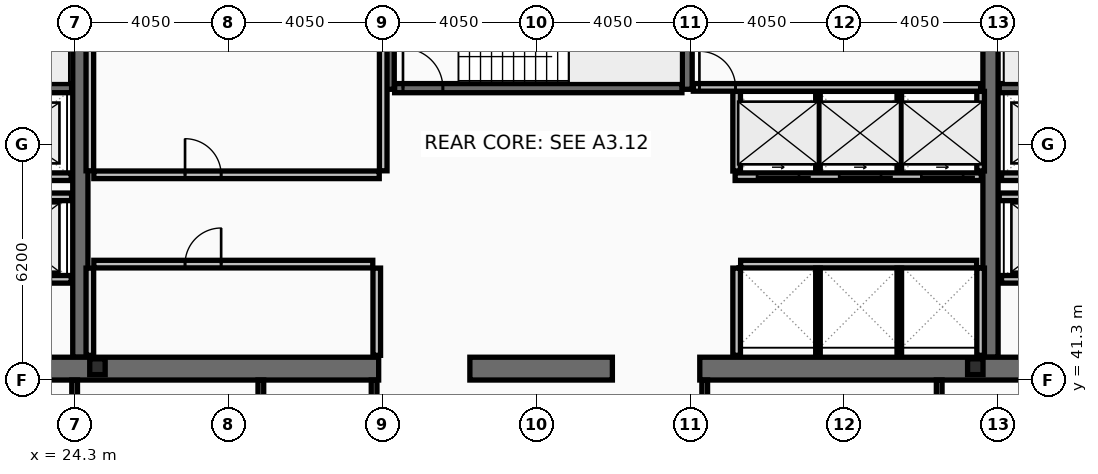
"""IFC4 building model, lengths in metres.
Left out: names, types, materials, properties, quantities, classifications, styles, units other than length and angle.
Written with IfcOpenShell. Run it as: python <this file> out.ifc"""

import sys

from ifc_helpers import new_model, si_unit, direction, frame, frame_2d, origin, origin_2d, place, context, subcontext, project, spatial, rectangle, i_section, extrude, element, fill, save


model = new_model("IFC4")
c1 = context("Model", 3, precision=1e-05, world=origin(), true_north=direction((0.0, 1.0)))
c2 = subcontext(c1, "Body", "Model", "MODEL_VIEW")
j1 = project(units=[si_unit("LENGTHUNIT", "METRE"), si_unit("PLANEANGLEUNIT", "RADIAN")], contexts=[c1])
p1 = place(None, origin())
s1 = spatial("IfcSite", under=j1, at=p1, CompositionType="ELEMENT")
p2 = place(p1, origin())
s2 = spatial("IfcBuilding", under=s1, at=p2, CompositionType="ELEMENT")
p3 = place(p2, frame((0.0, 0.0, 249.8)))
s3 = spatial("IfcBuildingStorey", under=s2, at=p3, CompositionType="ELEMENT", Elevation=249.8)
for number, where, z_axis, x_axis in (
    (1, (24.45, 41.9, 0.0), (0.0, 0.0, 1.0), (0.0, 1.0, 0.0)),
    (2, (48.4, 41.9, 0.0), (0.0, 0.0, 1.0), (0.0, 1.0, 0.0)),
):
    element("IfcWall", number, at=place(p3, frame(where, z_axis=z_axis, x_axis=x_axis)), inside=s3, PredefinedType="SHEAR", context=c2, shape_type="SweptSolid", body=[
        extrude(rectangle(XDim=11.2, YDim=0.4, at=frame_2d((5.6, 0.0))), origin(), (0.0, 0.0, 1.0), 3.44),
    ])
p4 = place(p3, frame((32.3, 41.6, 0.0), z_axis=(0.0, 0.0, 1.0), x_axis=(-1.0, 0.0, 0.0)))
e3 = element("IfcWall", 3, at=p4, inside=s3, PredefinedType="SHEAR", context=c2, shape_type="SweptSolid", body=[
    extrude(rectangle(XDim=11.45, YDim=0.6, at=frame_2d((5.725, 0.0))), origin(), (0.0, 0.0, 1.0), 3.44),
])
p5 = place(p3, frame((38.45, 41.6, 0.0), z_axis=(0.0, 0.0, 1.0), x_axis=(-1.0, 0.0, 0.0)))
e4 = element("IfcWall", 4, at=p5, inside=s3, PredefinedType="SHEAR", context=c2, shape_type="SweptSolid", body=[
    extrude(rectangle(XDim=3.75, YDim=0.6, at=frame_2d((1.875, 0.0))), origin(), (0.0, 0.0, 1.0), 3.44),
])
p6 = place(p3, frame((52.05, 41.6, 0.0), z_axis=(0.0, 0.0, 1.0), x_axis=(-1.0, 0.0, 0.0)))
e5 = element("IfcWall", 5, at=p6, inside=s3, PredefinedType="SHEAR", context=c2, shape_type="SweptSolid", body=[
    extrude(rectangle(XDim=11.3, YDim=0.6, at=frame_2d((5.65, 0.0))), origin(), (0.0, 0.0, 1.0), 3.44),
])
for number, where, z_axis, x_axis in (
    (6, (32.58, 48.95, 0.0), (0.0, 0.0, 1.0), (0.0, 1.0, 0.0)),
    (7, (40.42, 48.95, 0.0), (0.0, 0.0, 1.0), (0.0, 1.0, 0.0)),
):
    element("IfcWall", number, at=place(p3, frame(where, z_axis=z_axis, x_axis=x_axis)), inside=s3, PredefinedType="SHEAR", context=c2, shape_type="SweptSolid", body=[
        extrude(rectangle(XDim=4.15, YDim=0.26, at=frame_2d((2.075, 0.0))), origin(), (0.0, 0.0, 1.0), 3.44),
    ])
p7 = place(p3, frame((16.8, 48.98, 0.0), z_axis=(0.0, 0.0, 1.0), x_axis=(1.0, 0.0, 0.0)))
e8 = element("IfcWall", 8, at=p7, inside=s3, PredefinedType="SHEAR", context=c2, shape_type="SweptSolid", body=[
    extrude(rectangle(XDim=7.42, YDim=0.24, at=frame_2d((3.71, 0.0))), origin(), (0.0, 0.0, 1.0), 3.44),
])
p8 = place(p7, frame((0.22, 0.0, 0.0)))
e9 = element("IfcOpeningElement", 9, at=p8, cuts=e8, PredefinedType="OPENING", context=c2, shape_type="SweptSolid", body=[
    extrude(rectangle(XDim=1.05, YDim=2.15, at=frame_2d((0.525, 1.075))), frame((0.0, 0.13, 0.0), z_axis=(0.0, -1.0, 0.0), x_axis=(1.0, 0.0, 0.0)), (0.0, 0.0, 1.0), 0.26),
])
p9 = place(p3, frame((48.63, 48.98, 0.0), z_axis=(0.0, 0.0, 1.0), x_axis=(1.0, 0.0, 0.0)))
e10 = element("IfcWall", 10, at=p9, inside=s3, PredefinedType="SHEAR", context=c2, shape_type="SweptSolid", body=[
    extrude(rectangle(XDim=7.47, YDim=0.24, at=frame_2d((3.735, 0.0))), origin(), (0.0, 0.0, 1.0), 3.44),
])
p10 = place(p9, frame((6.2, 0.0, 0.0)))
e11 = element("IfcOpeningElement", 11, at=p10, cuts=e10, PredefinedType="OPENING", context=c2, shape_type="SweptSolid", body=[
    extrude(rectangle(XDim=1.05, YDim=2.15, at=frame_2d((0.525, 1.075))), frame((0.0, 0.13, 0.0), z_axis=(0.0, -1.0, 0.0), x_axis=(1.0, 0.0, 0.0)), (0.0, 0.0, 1.0), 0.26),
])
p11 = place(p3, frame((32.72, 48.98, 0.0), z_axis=(0.0, 0.0, 1.0), x_axis=(1.0, 0.0, 0.0)))
e12 = element("IfcWall", 12, at=p11, inside=s3, PredefinedType="SHEAR", context=c2, shape_type="SweptSolid", body=[
    extrude(rectangle(XDim=7.56, YDim=0.24, at=frame_2d((3.78, 0.0))), origin(), (0.0, 0.0, 1.0), 3.44),
])
p12 = place(p11, frame((0.22, 0.0, 0.0)))
e13 = element("IfcOpeningElement", 13, at=p12, cuts=e12, PredefinedType="OPENING", context=c2, shape_type="SweptSolid", body=[
    extrude(rectangle(XDim=1.05, YDim=2.15, at=frame_2d((0.525, 1.075))), frame((0.0, 0.13, 0.0), z_axis=(0.0, -1.0, 0.0), x_axis=(1.0, 0.0, 0.0)), (0.0, 0.0, 1.0), 0.26),
])
for number, where, z_axis, x_axis in (
    (14, (24.9, 41.65, 0.0), (0.0, 0.0, 1.0), (1.0, 0.0, 0.0)),
    (15, (48.0, 41.65, 0.0), (0.0, 0.0, 1.0), (1.0, 0.0, 0.0)),
):
    element("IfcColumn", number, at=place(p3, frame(where, z_axis=z_axis, x_axis=x_axis)), inside=s3, PredefinedType="COLUMN", context=c2, shape_type="SweptSolid", body=[
        extrude(i_section(OverallWidth=0.406, OverallDepth=0.416, WebThickness=0.03, FlangeThickness=0.048, at=origin_2d()), origin(), (0.0, 0.0, 1.0), 3.6),
    ])
p13 = place(p3, frame((51.61, 43.95, 0.0), z_axis=(0.0, 0.0, 1.0), x_axis=(-1.0, 0.0, 0.0)))
e16 = element("IfcWall", 16, at=p13, inside=s3, PredefinedType="PARTITIONING", context=c2, shape_type="SweptSolid", body=[
    extrude(rectangle(XDim=2.92, YDim=0.2, at=frame_2d((1.46, 0.0))), origin(), (0.0, 0.0, 1.0), 3.44),
])
p14 = place(p13, frame((0.81, 0.0, 0.0)))
e17 = element("IfcOpeningElement", 17, at=p14, cuts=e16, PredefinedType="OPENING", context=c2, shape_type="SweptSolid", body=[
    extrude(rectangle(XDim=1.3, YDim=2.18, at=frame_2d((0.65, 1.09))), frame((0.0, 0.11, 0.0), z_axis=(0.0, -1.0, 0.0), x_axis=(1.0, 0.0, 0.0)), (0.0, 0.0, 1.0), 0.22),
])
p15 = place(p3, frame((24.21, 43.95, 0.0), z_axis=(0.0, 0.0, 1.0), x_axis=(-1.0, 0.0, 0.0)))
e18 = element("IfcWall", 18, at=p15, inside=s3, PredefinedType="PARTITIONING", context=c2, shape_type="SweptSolid", body=[
    extrude(rectangle(XDim=2.97, YDim=0.2, at=frame_2d((1.485, 0.0))), origin(), (0.0, 0.0, 1.0), 3.44),
])
p16 = place(p15, frame((0.86, 0.0, 0.0)))
e19 = element("IfcOpeningElement", 19, at=p16, cuts=e18, PredefinedType="OPENING", context=c2, shape_type="SweptSolid", body=[
    extrude(rectangle(XDim=1.3, YDim=2.18, at=frame_2d((0.65, 1.09))), frame((0.0, 0.11, 0.0), z_axis=(0.0, -1.0, 0.0), x_axis=(1.0, 0.0, 0.0)), (0.0, 0.0, 1.0), 0.22),
])
p17 = place(p3, frame((51.61, 46.65, 0.0), z_axis=(0.0, 0.0, 1.0), x_axis=(-1.0, 0.0, 0.0)))
e20 = element("IfcWall", 20, at=p17, inside=s3, PredefinedType="PARTITIONING", context=c2, shape_type="SweptSolid", body=[
    extrude(rectangle(XDim=2.92, YDim=0.2, at=frame_2d((1.46, 0.0))), origin(), (0.0, 0.0, 1.0), 3.44),
])
p18 = place(p17, frame((0.86, 0.0, 0.0)))
e21 = element("IfcOpeningElement", 21, at=p18, cuts=e20, PredefinedType="OPENING", context=c2, shape_type="SweptSolid", body=[
    extrude(rectangle(XDim=1.2, YDim=2.18, at=frame_2d((0.6, 1.09))), frame((0.0, 0.11, 0.0), z_axis=(0.0, -1.0, 0.0), x_axis=(1.0, 0.0, 0.0)), (0.0, 0.0, 1.0), 0.22),
])
p19 = place(p3, frame((24.21, 46.65, 0.0), z_axis=(0.0, 0.0, 1.0), x_axis=(-1.0, 0.0, 0.0)))
e22 = element("IfcWall", 22, at=p19, inside=s3, PredefinedType="PARTITIONING", context=c2, shape_type="SweptSolid", body=[
    extrude(rectangle(XDim=2.97, YDim=0.2, at=frame_2d((1.485, 0.0))), origin(), (0.0, 0.0, 1.0), 3.44),
])
p20 = place(p19, frame((0.91, 0.0, 0.0)))
e23 = element("IfcOpeningElement", 23, at=p20, cuts=e22, PredefinedType="OPENING", context=c2, shape_type="SweptSolid", body=[
    extrude(rectangle(XDim=1.2, YDim=2.18, at=frame_2d((0.6, 1.09))), frame((0.0, 0.11, 0.0), z_axis=(0.0, -1.0, 0.0), x_axis=(1.0, 0.0, 0.0)), (0.0, 0.0, 1.0), 0.22),
])
p21 = place(p3, frame((48.16, 46.65, 0.0), z_axis=(0.0, 0.0, 1.0), x_axis=(-1.0, 0.0, 0.0)))
e24 = element("IfcWall", 24, at=p21, inside=s3, PredefinedType="PARTITIONING", context=c2, shape_type="SweptSolid", body=[
    extrude(rectangle(XDim=6.48, YDim=0.2, at=frame_2d((3.24, 0.0))), origin(), (0.0, 0.0, 1.0), 3.44),
])
p22 = place(p21, frame((4.8, 0.0, 0.0)))
e25 = element("IfcOpeningElement", 25, at=p22, cuts=e24, PredefinedType="OPENING", context=c2, shape_type="SweptSolid", body=[
    extrude(rectangle(XDim=1.1, YDim=2.18, at=frame_2d((0.55, 1.09))), frame((0.0, 0.11, 0.0), z_axis=(0.0, -1.0, 0.0), x_axis=(1.0, 0.0, 0.0)), (0.0, 0.0, 1.0), 0.22),
])
p23 = place(p21, frame((2.64, 0.0, 0.0)))
e26 = element("IfcOpeningElement", 26, at=p23, cuts=e24, PredefinedType="OPENING", context=c2, shape_type="SweptSolid", body=[
    extrude(rectangle(XDim=1.1, YDim=2.18, at=frame_2d((0.55, 1.09))), frame((0.0, 0.11, 0.0), z_axis=(0.0, -1.0, 0.0), x_axis=(1.0, 0.0, 0.0)), (0.0, 0.0, 1.0), 0.22),
])
p24 = place(p21, frame((0.48, 0.0, 0.0)))
e27 = element("IfcOpeningElement", 27, at=p24, cuts=e24, PredefinedType="OPENING", context=c2, shape_type="SweptSolid", body=[
    extrude(rectangle(XDim=1.1, YDim=2.18, at=frame_2d((0.55, 1.09))), frame((0.0, 0.11, 0.0), z_axis=(0.0, -1.0, 0.0), x_axis=(1.0, 0.0, 0.0)), (0.0, 0.0, 1.0), 0.22),
])
p25 = place(p3, frame((21.2, 46.12, 0.0), z_axis=(0.0, 0.0, 1.0), x_axis=(1.0, 0.0, 0.0)))
e28 = element("IfcWall", 28, at=p25, inside=s3, PredefinedType="PARTITIONING", context=c2, shape_type="SweptSolid", body=[
    extrude(rectangle(XDim=3.02, YDim=0.2, at=frame_2d((1.51, 0.0))), origin(), (0.0, 0.0, 1.0), 3.44),
])
p26 = place(p3, frame((48.63, 46.12, 0.0), z_axis=(0.0, 0.0, 1.0), x_axis=(1.0, 0.0, 0.0)))
e29 = element("IfcWall", 29, at=p26, inside=s3, PredefinedType="PARTITIONING", context=c2, shape_type="SweptSolid", body=[
    extrude(rectangle(XDim=3.07, YDim=0.2, at=frame_2d((1.535, 0.0))), origin(), (0.0, 0.0, 1.0), 3.44),
])
for number, where, z_axis, x_axis in (
    (30, (24.7, 46.805, 0.0), (0.0, 0.0, 1.0), (0.0, 1.0, 0.0)),
    (31, (32.42, 46.805, 0.0), (0.0, 0.0, 1.0), (0.0, 1.0, 0.0)),
):
    element("IfcWall", number, at=place(p3, frame(where, z_axis=z_axis, x_axis=x_axis)), inside=s3, PredefinedType="PARTITIONING", context=c2, shape_type="SweptSolid", body=[
        extrude(rectangle(XDim=5.99, YDim=0.2, at=frame_2d((2.995, 0.0))), origin(), (0.0, 0.0, 1.0), 3.44),
    ])
p27 = place(p3, frame((24.805, 46.7, 0.0), z_axis=(0.0, 0.0, 1.0), x_axis=(1.0, 0.0, 0.0)))
e32 = element("IfcWall", 32, at=p27, inside=s3, PredefinedType="PARTITIONING", context=c2, shape_type="SweptSolid", body=[
    extrude(rectangle(XDim=7.51, YDim=0.2, at=frame_2d((3.755, 0.0))), origin(), (0.0, 0.0, 1.0), 3.44),
])
p28 = place(p27, frame((2.4, 0.0, 0.0)))
e33 = element("IfcOpeningElement", 33, at=p28, cuts=e32, PredefinedType="OPENING", context=c2, shape_type="SweptSolid", body=[
    extrude(rectangle(XDim=0.95, YDim=2.1, at=frame_2d((0.475, 1.05))), frame((0.0, 0.11, 0.0), z_axis=(0.0, -1.0, 0.0), x_axis=(1.0, 0.0, 0.0)), (0.0, 0.0, 1.0), 0.22),
])
for number, where, z_axis, x_axis in (
    (34, (24.7, 41.95, 0.0), (0.0, 0.0, 1.0), (0.0, 1.0, 0.0)),
    (35, (32.25, 41.95, 0.0), (0.0, 0.0, 1.0), (0.0, 1.0, 0.0)),
):
    element("IfcWall", number, at=place(p3, frame(where, z_axis=z_axis, x_axis=x_axis)), inside=s3, PredefinedType="PARTITIONING", context=c2, shape_type="SweptSolid", body=[
        extrude(rectangle(XDim=2.295, YDim=0.2, at=frame_2d((1.147, 0.0))), origin(), (0.0, 0.0, 1.0), 3.44),
    ])
p29 = place(p3, frame((24.805, 44.35, 0.0), z_axis=(0.0, 0.0, 1.0), x_axis=(1.0, 0.0, 0.0)))
e36 = element("IfcWall", 36, at=p29, inside=s3, PredefinedType="PARTITIONING", context=c2, shape_type="SweptSolid", body=[
    extrude(rectangle(XDim=7.34, YDim=0.2, at=frame_2d((3.67, 0.0))), origin(), (0.0, 0.0, 1.0), 3.44),
])
p30 = place(p29, frame((2.4, 0.0, 0.0)))
e37 = element("IfcOpeningElement", 37, at=p30, cuts=e36, PredefinedType="OPENING", context=c2, shape_type="SweptSolid", body=[
    extrude(rectangle(XDim=0.95, YDim=2.1, at=frame_2d((0.475, 1.05))), frame((0.0, 0.11, 0.0), z_axis=(0.0, -1.0, 0.0), x_axis=(1.0, 0.0, 0.0)), (0.0, 0.0, 1.0), 0.22),
])
for number, where, z_axis, x_axis in (
    (38, (41.72, 46.8, 0.0), (0.0, 0.0, 1.0), (0.0, 1.0, 0.0)),
    (39, (48.14, 46.8, 0.0), (0.0, 0.0, 1.0), (0.0, 1.0, 0.0)),
):
    element("IfcWall", number, at=place(p3, frame(where, z_axis=z_axis, x_axis=x_axis)), inside=s3, PredefinedType="PARTITIONING", context=c2, shape_type="SweptSolid", body=[
        extrude(rectangle(XDim=2.095, YDim=0.2, at=frame_2d((1.047, 0.0))), origin(), (0.0, 0.0, 1.0), 3.44),
    ])
for number, where, z_axis, x_axis in (
    (40, (43.86, 46.8, 0.0), (0.0, 0.0, 1.0), (0.0, 1.0, 0.0)),
    (41, (46.0, 46.8, 0.0), (0.0, 0.0, 1.0), (0.0, 1.0, 0.0)),
):
    element("IfcWall", number, at=place(p3, frame(where, z_axis=z_axis, x_axis=x_axis)), inside=s3, PredefinedType="PARTITIONING", context=c2, shape_type="SweptSolid", body=[
        extrude(rectangle(XDim=2.095, YDim=0.12, at=frame_2d((1.047, 0.0))), origin(), (0.0, 0.0, 1.0), 3.44),
    ])
p31 = place(p3, frame((41.825, 44.35, 0.0), z_axis=(0.0, 0.0, 1.0), x_axis=(1.0, 0.0, 0.0)))
e42 = element("IfcWall", 42, at=p31, inside=s3, PredefinedType="PARTITIONING", context=c2, shape_type="SweptSolid", body=[
    extrude(rectangle(XDim=6.21, YDim=0.2, at=frame_2d((3.105, 0.0))), origin(), (0.0, 0.0, 1.0), 3.44),
])
for number, where, z_axis, x_axis in (
    (43, (41.72, 41.95, 0.0), (0.0, 0.0, 1.0), (0.0, 1.0, 0.0)),
    (44, (48.14, 41.95, 0.0), (0.0, 0.0, 1.0), (0.0, 1.0, 0.0)),
):
    element("IfcWall", number, at=place(p3, frame(where, z_axis=z_axis, x_axis=x_axis)), inside=s3, PredefinedType="PARTITIONING", context=c2, shape_type="SweptSolid", body=[
        extrude(rectangle(XDim=2.295, YDim=0.2, at=frame_2d((1.147, 0.0))), origin(), (0.0, 0.0, 1.0), 3.44),
    ])
for number, where, z_axis, x_axis in (
    (45, (43.86, 41.95, 0.0), (0.0, 0.0, 1.0), (0.0, 1.0, 0.0)),
    (46, (46.0, 41.95, 0.0), (0.0, 0.0, 1.0), (0.0, 1.0, 0.0)),
):
    element("IfcWall", number, at=place(p3, frame(where, z_axis=z_axis, x_axis=x_axis)), inside=s3, PredefinedType="PARTITIONING", context=c2, shape_type="SweptSolid", body=[
        extrude(rectangle(XDim=2.295, YDim=0.12, at=frame_2d((1.147, 0.0))), origin(), (0.0, 0.0, 1.0), 3.44),
    ])
p32 = place(p3, frame((40.58, 49.0, 0.0), z_axis=(0.0, 0.0, 1.0), x_axis=(1.0, 0.0, 0.0)))
e47 = element("IfcWall", 47, at=p32, inside=s3, PredefinedType="PARTITIONING", context=c2, shape_type="SweptSolid", body=[
    extrude(rectangle(XDim=7.56, YDim=0.2, at=frame_2d((3.78, 0.0))), origin(), (0.0, 0.0, 1.0), 3.44),
])
p33 = place(p32, frame((0.16, 0.0, 0.0)))
e48 = element("IfcOpeningElement", 48, at=p33, cuts=e47, PredefinedType="OPENING", context=c2, shape_type="SweptSolid", body=[
    extrude(rectangle(XDim=0.95, YDim=2.1, at=frame_2d((0.475, 1.05))), frame((0.0, 0.11, 0.0), z_axis=(0.0, -1.0, 0.0), x_axis=(1.0, 0.0, 0.0)), (0.0, 0.0, 1.0), 0.22),
])
for number, where, z_axis, x_axis in (
    (49, (24.3, 38.28, 0.0), (0.0, 0.0, 1.0), (0.0, 1.0, 0.0)),
    (50, (29.2, 38.28, 0.0), (0.0, 0.0, 1.0), (0.0, 1.0, 0.0)),
    (51, (32.18, 38.28, 0.0), (0.0, 0.0, 1.0), (0.0, 1.0, 0.0)),
    (52, (40.88, 38.28, 0.0), (0.0, 0.0, 1.0), (0.0, 1.0, 0.0)),
    (53, (47.05, 38.28, 0.0), (0.0, 0.0, 1.0), (0.0, 1.0, 0.0)),
):
    element("IfcWall", number, at=place(p3, frame(where, z_axis=z_axis, x_axis=x_axis)), inside=s3, PredefinedType="PARTITIONING", context=c2, shape_type="SweptSolid", body=[
        extrude(rectangle(XDim=3.02, YDim=0.15, at=frame_2d((1.51, 0.0))), origin(), (0.0, 0.0, 1.0), 3.44),
    ])
p34 = place(p12, origin())
e54 = element("IfcDoor", 54, at=p34, inside=s3, OperationType="SINGLE_SWING_LEFT", PredefinedType="DOOR", context=c2, shape_type="SweptSolid", body=[
    extrude(rectangle(XDim=1.05, YDim=2.15, at=frame_2d((0.525, 1.075))), frame((0.0, 0.025, 0.0), z_axis=(0.0, -1.0, 0.0), x_axis=(1.0, 0.0, 0.0)), (0.0, 0.0, 1.0), 0.05),
])
fill(e13, e54)
p35 = place(p22, origin())
e55 = element("IfcDoor", 55, at=p35, inside=s3, OperationType="SLIDING_TO_LEFT", PredefinedType="DOOR", context=c2, shape_type="SweptSolid", body=[
    extrude(rectangle(XDim=1.1, YDim=2.18, at=frame_2d((0.55, 1.09))), frame((0.0, 0.025, 0.0), z_axis=(0.0, -1.0, 0.0), x_axis=(1.0, 0.0, 0.0)), (0.0, 0.0, 1.0), 0.05),
])
fill(e25, e55)
p36 = place(p23, origin())
e56 = element("IfcDoor", 56, at=p36, inside=s3, OperationType="SLIDING_TO_LEFT", PredefinedType="DOOR", context=c2, shape_type="SweptSolid", body=[
    extrude(rectangle(XDim=1.1, YDim=2.18, at=frame_2d((0.55, 1.09))), frame((0.0, 0.025, 0.0), z_axis=(0.0, -1.0, 0.0), x_axis=(1.0, 0.0, 0.0)), (0.0, 0.0, 1.0), 0.05),
])
fill(e26, e56)
p37 = place(p24, origin())
e57 = element("IfcDoor", 57, at=p37, inside=s3, OperationType="SLIDING_TO_LEFT", PredefinedType="DOOR", context=c2, shape_type="SweptSolid", body=[
    extrude(rectangle(XDim=1.1, YDim=2.18, at=frame_2d((0.55, 1.09))), frame((0.0, 0.025, 0.0), z_axis=(0.0, -1.0, 0.0), x_axis=(1.0, 0.0, 0.0)), (0.0, 0.0, 1.0), 0.05),
])
fill(e27, e57)
p38 = place(p28, origin())
e58 = element("IfcDoor", 58, at=p38, inside=s3, OperationType="SINGLE_SWING_LEFT", PredefinedType="DOOR", context=c2, shape_type="SweptSolid", body=[
    extrude(rectangle(XDim=0.95, YDim=2.1, at=frame_2d((0.475, 1.05))), frame((0.0, 0.025, 0.0), z_axis=(0.0, -1.0, 0.0), x_axis=(1.0, 0.0, 0.0)), (0.0, 0.0, 1.0), 0.05),
])
fill(e33, e58)
p39 = place(p30, origin())
e59 = element("IfcDoor", 59, at=p39, inside=s3, OperationType="SINGLE_SWING_RIGHT", PredefinedType="DOOR", context=c2, shape_type="SweptSolid", body=[
    extrude(rectangle(XDim=0.95, YDim=2.1, at=frame_2d((0.475, 1.05))), frame((0.0, 0.025, 0.0), z_axis=(0.0, -1.0, 0.0), x_axis=(1.0, 0.0, 0.0)), (0.0, 0.0, 1.0), 0.05),
])
fill(e37, e59)
p40 = place(p33, origin())
e60 = element("IfcDoor", 60, at=p40, inside=s3, OperationType="SINGLE_SWING_LEFT", PredefinedType="DOOR", context=c2, shape_type="SweptSolid", body=[
    extrude(rectangle(XDim=0.95, YDim=2.1, at=frame_2d((0.475, 1.05))), frame((0.0, 0.025, 0.0), z_axis=(0.0, -1.0, 0.0), x_axis=(1.0, 0.0, 0.0)), (0.0, 0.0, 1.0), 0.05),
])
fill(e48, e60)
save(model, sys.argv[1])
